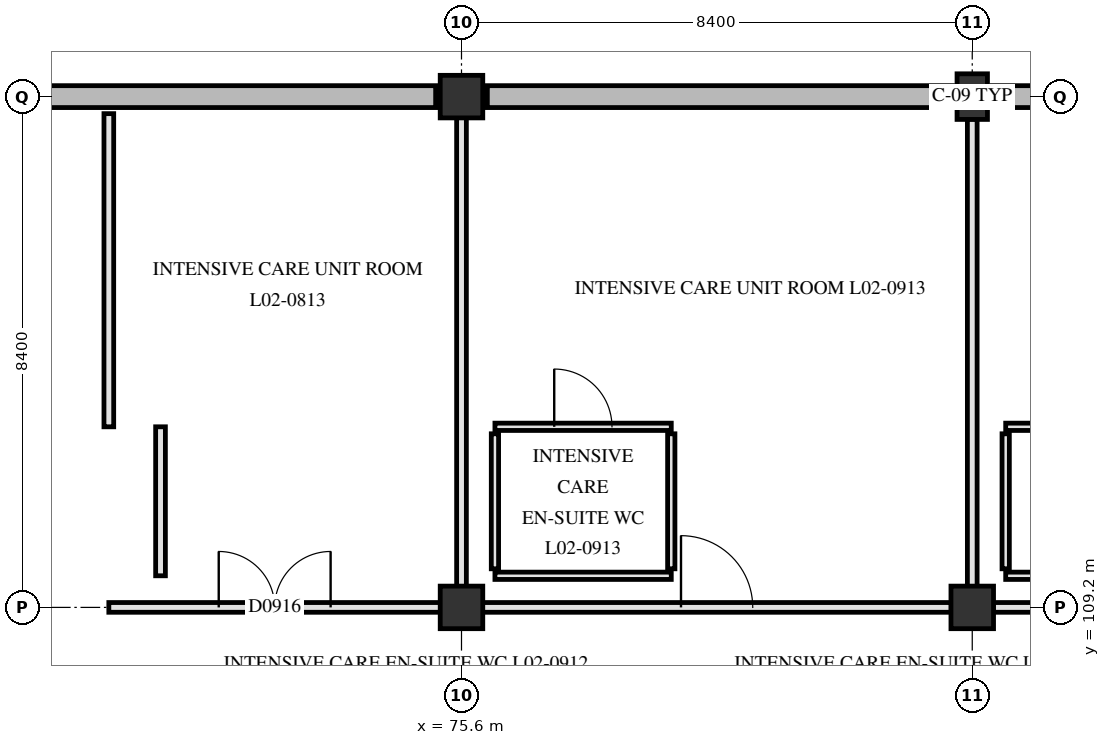
"""IFC4 building model, lengths in metres.
Left out: names, types, materials, properties, quantities, classifications, styles, units other than length and angle.
Written with IfcOpenShell. Run it as: python <this file> out.ifc"""

import sys

from ifc_helpers import new_model, si_unit, direction, frame, frame_2d, origin, origin_2d, place, context, subcontext, project, spatial, rectangle, extrude, element, fill, save


model = new_model("IFC4")
c1 = context("Model", 3, precision=1e-05, world=origin(), true_north=direction((0.0, 1.0)))
c2 = subcontext(c1, "Body", "Model", "MODEL_VIEW")
j1 = project(units=[si_unit("LENGTHUNIT", "METRE"), si_unit("PLANEANGLEUNIT", "RADIAN")], contexts=[c1])
p1 = place(None, origin())
s1 = spatial("IfcSite", under=j1, at=p1, CompositionType="ELEMENT")
p2 = place(p1, origin())
s2 = spatial("IfcBuilding", under=s1, at=p2, CompositionType="ELEMENT")
p3 = place(p2, frame((0.0, 0.0, 9.3)))
s3 = spatial("IfcBuildingStorey", under=s2, at=p3, CompositionType="ELEMENT", Elevation=9.3)
for number, where, z_axis, x_axis in (
    (1, (75.6, 109.2, 0.0), (0.0, 0.0, 1.0), (1.0, 0.0, 0.0)),
    (2, (75.6, 117.6, 0.0), (0.0, 0.0, 1.0), (1.0, 0.0, 0.0)),
    (3, (84.0, 109.2, 0.0), (0.0, 0.0, 1.0), (1.0, 0.0, 0.0)),
):
    element("IfcColumn", number, at=place(p3, frame(where, z_axis=z_axis, x_axis=x_axis)), inside=s3, PredefinedType="COLUMN", context=c2, shape_type="SweptSolid", body=[
        extrude(rectangle(XDim=0.7, YDim=0.7, at=origin_2d()), origin(), (0.0, 0.0, 1.0), 5.1),
    ])
p4 = place(p3, frame((84.0, 117.6, 0.0), z_axis=(0.0, 0.0, 1.0), x_axis=(1.0, 0.0, 0.0)))
e4 = element("IfcColumn", 4, at=p4, inside=s3, PredefinedType="PILASTER", context=c2, shape_type="SweptSolid", body=[
    extrude(rectangle(XDim=0.5, YDim=0.75, at=origin_2d()), origin(), (0.0, 0.0, 1.0), 5.1),
])
p5 = place(p3, frame((67.625, 117.6, 0.0), z_axis=(0.0, 0.0, 1.0), x_axis=(1.0, 0.0, 0.0)))
e5 = element("IfcWall", 5, at=p5, inside=s3, PredefinedType="SOLIDWALL", context=c2, shape_type="SweptSolid", body=[
    extrude(rectangle(XDim=7.55, YDim=0.36, at=frame_2d((3.775, 0.0))), origin(), (0.0, 0.0, 1.0), 4.78),
])
for number, where, z_axis, x_axis in (
    (6, (76.025, 117.6, 0.0), (0.0, 0.0, 1.0), (1.0, 0.0, 0.0)),
    (7, (84.325, 117.6, 0.0), (0.0, 0.0, 1.0), (1.0, 0.0, 0.0)),
):
    element("IfcWall", number, at=place(p3, frame(where, z_axis=z_axis, x_axis=x_axis)), inside=s3, PredefinedType="SOLIDWALL", context=c2, shape_type="SweptSolid", body=[
        extrude(rectangle(XDim=7.65, YDim=0.36, at=frame_2d((3.825, 0.0))), origin(), (0.0, 0.0, 1.0), 4.78),
    ])
p6 = place(p3, frame((69.8, 109.2, 0.0), z_axis=(0.0, 0.0, 1.0), x_axis=(1.0, 0.0, 0.0)))
e8 = element("IfcWall", 8, at=p6, inside=s3, PredefinedType="PARTITIONING", context=c2, shape_type="SweptSolid", body=[
    extrude(rectangle(XDim=5.455, YDim=0.16, at=frame_2d((2.728, 0.0))), origin(), (0.0, 0.0, 1.0), 4.17),
])
p7 = place(p6, frame((1.808, 0.0, 0.0)))
e9 = element("IfcOpeningElement", 9, at=p7, cuts=e8, PredefinedType="OPENING", context=c2, shape_type="SweptSolid", body=[
    extrude(rectangle(XDim=1.84, YDim=2.28, at=frame_2d((0.92, 1.14))), frame((0.0, 0.09, 0.0), z_axis=(0.0, -1.0, 0.0), x_axis=(1.0, 0.0, 0.0)), (0.0, 0.0, 1.0), 0.18),
])
p8 = place(p3, frame((75.945, 109.2, 0.0), z_axis=(0.0, 0.0, 1.0), x_axis=(1.0, 0.0, 0.0)))
e10 = element("IfcWall", 10, at=p8, inside=s3, PredefinedType="PARTITIONING", context=c2, shape_type="SweptSolid", body=[
    extrude(rectangle(XDim=7.71, YDim=0.16, at=frame_2d((3.855, 0.0))), origin(), (0.0, 0.0, 1.0), 4.17),
])
p9 = place(p8, frame((3.265, 0.0, 0.0)))
e11 = element("IfcOpeningElement", 11, at=p9, cuts=e10, PredefinedType="OPENING", context=c2, shape_type="SweptSolid", body=[
    extrude(rectangle(XDim=1.18, YDim=2.18, at=frame_2d((0.59, 1.09))), frame((0.0, 0.09, 0.0), z_axis=(0.0, -1.0, 0.0), x_axis=(1.0, 0.0, 0.0)), (0.0, 0.0, 1.0), 0.18),
])
p10 = place(p3, frame((84.345, 109.2, 0.0), z_axis=(0.0, 0.0, 1.0), x_axis=(1.0, 0.0, 0.0)))
e12 = element("IfcWall", 12, at=p10, inside=s3, PredefinedType="PARTITIONING", context=c2, shape_type="SweptSolid", body=[
    extrude(rectangle(XDim=7.71, YDim=0.16, at=frame_2d((3.855, 0.0))), origin(), (0.0, 0.0, 1.0), 4.17),
])
p11 = place(p10, frame((4.125, 0.0, 0.0)))
e13 = element("IfcOpeningElement", 13, at=p11, cuts=e12, PredefinedType="OPENING", context=c2, shape_type="SweptSolid", body=[
    extrude(rectangle(XDim=1.7, YDim=2.25, at=frame_2d((0.85, 1.125))), frame((0.0, 0.09, 0.0), z_axis=(0.0, -1.0, 0.0), x_axis=(1.0, 0.0, 0.0)), (0.0, 0.0, 1.0), 0.18),
])
p12 = place(p3, frame((76.15, 109.72, 0.0), z_axis=(0.0, 0.0, 1.0), x_axis=(1.0, 0.0, 0.0)))
e14 = element("IfcWall", 14, at=p12, inside=s3, PredefinedType="PARTITIONING", context=c2, shape_type="SweptSolid", body=[
    extrude(rectangle(XDim=2.9, YDim=0.12, at=frame_2d((1.45, 0.0))), origin(), (0.0, 0.0, 1.0), 4.77),
])
p13 = place(p3, frame((84.55, 109.72, 0.0), z_axis=(0.0, 0.0, 1.0), x_axis=(1.0, 0.0, 0.0)))
e15 = element("IfcWall", 15, at=p13, inside=s3, PredefinedType="PARTITIONING", context=c2, shape_type="SweptSolid", body=[
    extrude(rectangle(XDim=2.9, YDim=0.12, at=frame_2d((1.45, 0.0))), origin(), (0.0, 0.0, 1.0), 4.77),
])
p14 = place(p3, frame((76.15, 112.17, 0.0), z_axis=(0.0, 0.0, 1.0), x_axis=(1.0, 0.0, 0.0)))
e16 = element("IfcWall", 16, at=p14, inside=s3, PredefinedType="PARTITIONING", context=c2, shape_type="SweptSolid", body=[
    extrude(rectangle(XDim=2.9, YDim=0.12, at=frame_2d((1.45, 0.0))), origin(), (0.0, 0.0, 1.0), 4.77),
])
p15 = place(p14, frame((0.975, 0.0, 0.0)))
e17 = element("IfcOpeningElement", 17, at=p15, cuts=e16, PredefinedType="OPENING", context=c2, shape_type="SweptSolid", body=[
    extrude(rectangle(XDim=0.95, YDim=2.1, at=frame_2d((0.475, 1.05))), frame((0.0, 0.07, 0.0), z_axis=(0.0, -1.0, 0.0), x_axis=(1.0, 0.0, 0.0)), (0.0, 0.0, 1.0), 0.14),
])
p16 = place(p3, frame((84.55, 112.17, 0.0), z_axis=(0.0, 0.0, 1.0), x_axis=(1.0, 0.0, 0.0)))
e18 = element("IfcWall", 18, at=p16, inside=s3, PredefinedType="PARTITIONING", context=c2, shape_type="SweptSolid", body=[
    extrude(rectangle(XDim=2.9, YDim=0.12, at=frame_2d((1.45, 0.0))), origin(), (0.0, 0.0, 1.0), 4.77),
])
p17 = place(p16, frame((0.975, 0.0, 0.0)))
e19 = element("IfcOpeningElement", 19, at=p17, cuts=e18, PredefinedType="OPENING", context=c2, shape_type="SweptSolid", body=[
    extrude(rectangle(XDim=0.95, YDim=2.1, at=frame_2d((0.475, 1.05))), frame((0.0, 0.07, 0.0), z_axis=(0.0, -1.0, 0.0), x_axis=(1.0, 0.0, 0.0)), (0.0, 0.0, 1.0), 0.14),
])
p18 = place(p3, frame((69.8, 112.17, 0.0), z_axis=(0.0, 0.0, 1.0), x_axis=(0.0, 1.0, 0.0)))
e20 = element("IfcWall", 20, at=p18, inside=s3, PredefinedType="PARTITIONING", context=c2, shape_type="SweptSolid", body=[
    extrude(rectangle(XDim=5.15, YDim=0.16, at=frame_2d((2.575, 0.0))), origin(), (0.0, 0.0, 1.0), 4.77),
])
p19 = place(p3, frame((70.65, 109.72, 0.0), z_axis=(0.0, 0.0, 1.0), x_axis=(0.0, 1.0, 0.0)))
e21 = element("IfcWall", 21, at=p19, inside=s3, PredefinedType="PARTITIONING", context=c2, shape_type="SweptSolid", body=[
    extrude(rectangle(XDim=2.45, YDim=0.16, at=frame_2d((1.225, 0.0))), origin(), (0.0, 0.0, 1.0), 4.77),
])
p20 = place(p3, frame((75.6, 109.545, 0.0), z_axis=(0.0, 0.0, 1.0), x_axis=(0.0, 1.0, 0.0)))
e22 = element("IfcWall", 22, at=p20, inside=s3, PredefinedType="PARTITIONING", context=c2, shape_type="SweptSolid", body=[
    extrude(rectangle(XDim=7.71, YDim=0.16, at=frame_2d((3.855, 0.0))), origin(), (0.0, 0.0, 1.0), 4.17),
])
for number, where, z_axis, x_axis in (
    (23, (76.15, 109.835, 0.0), (0.0, 0.0, 1.0), (0.0, 1.0, 0.0)),
    (24, (79.05, 109.835, 0.0), (0.0, 0.0, 1.0), (0.0, 1.0, 0.0)),
):
    element("IfcWall", number, at=place(p3, frame(where, z_axis=z_axis, x_axis=x_axis)), inside=s3, PredefinedType="PARTITIONING", context=c2, shape_type="SweptSolid", body=[
        extrude(rectangle(XDim=2.22, YDim=0.12, at=frame_2d((1.11, 0.0))), origin(), (0.0, 0.0, 1.0), 4.77),
    ])
p21 = place(p3, frame((84.0, 109.545, 0.0), z_axis=(0.0, 0.0, 1.0), x_axis=(0.0, 1.0, 0.0)))
e25 = element("IfcWall", 25, at=p21, inside=s3, PredefinedType="PARTITIONING", context=c2, shape_type="SweptSolid", body=[
    extrude(rectangle(XDim=7.685, YDim=0.16, at=frame_2d((3.843, 0.0))), origin(), (0.0, 0.0, 1.0), 4.17),
])
p22 = place(p3, frame((84.55, 109.835, 0.0), z_axis=(0.0, 0.0, 1.0), x_axis=(0.0, 1.0, 0.0)))
e26 = element("IfcWall", 26, at=p22, inside=s3, PredefinedType="PARTITIONING", context=c2, shape_type="SweptSolid", body=[
    extrude(rectangle(XDim=2.22, YDim=0.12, at=frame_2d((1.11, 0.0))), origin(), (0.0, 0.0, 1.0), 4.77),
])
p23 = place(p7, origin())
e27 = element("IfcDoor", 27, at=p23, inside=s3, OperationType="DOUBLE_SWING_LEFT", PredefinedType="DOOR", context=c2, shape_type="SweptSolid", body=[
    extrude(rectangle(XDim=1.84, YDim=2.28, at=frame_2d((0.92, 1.14))), frame((0.0, 0.025, 0.0), z_axis=(0.0, -1.0, 0.0), x_axis=(1.0, 0.0, 0.0)), (0.0, 0.0, 1.0), 0.05),
])
fill(e9, e27)
p24 = place(p9, origin())
e28 = element("IfcDoor", 28, at=p24, inside=s3, OperationType="SINGLE_SWING_LEFT", PredefinedType="DOOR", context=c2, shape_type="SweptSolid", body=[
    extrude(rectangle(XDim=1.18, YDim=2.18, at=frame_2d((0.59, 1.09))), frame((0.0, 0.025, 0.0), z_axis=(0.0, -1.0, 0.0), x_axis=(1.0, 0.0, 0.0)), (0.0, 0.0, 1.0), 0.05),
])
fill(e11, e28)
p25 = place(p15, origin())
e29 = element("IfcDoor", 29, at=p25, inside=s3, OperationType="SINGLE_SWING_LEFT", PredefinedType="DOOR", context=c2, shape_type="SweptSolid", body=[
    extrude(rectangle(XDim=0.95, YDim=2.1, at=frame_2d((0.475, 1.05))), frame((0.0, 0.025, 0.0), z_axis=(0.0, -1.0, 0.0), x_axis=(1.0, 0.0, 0.0)), (0.0, 0.0, 1.0), 0.05),
])
fill(e17, e29)
save(model, sys.argv[1])
